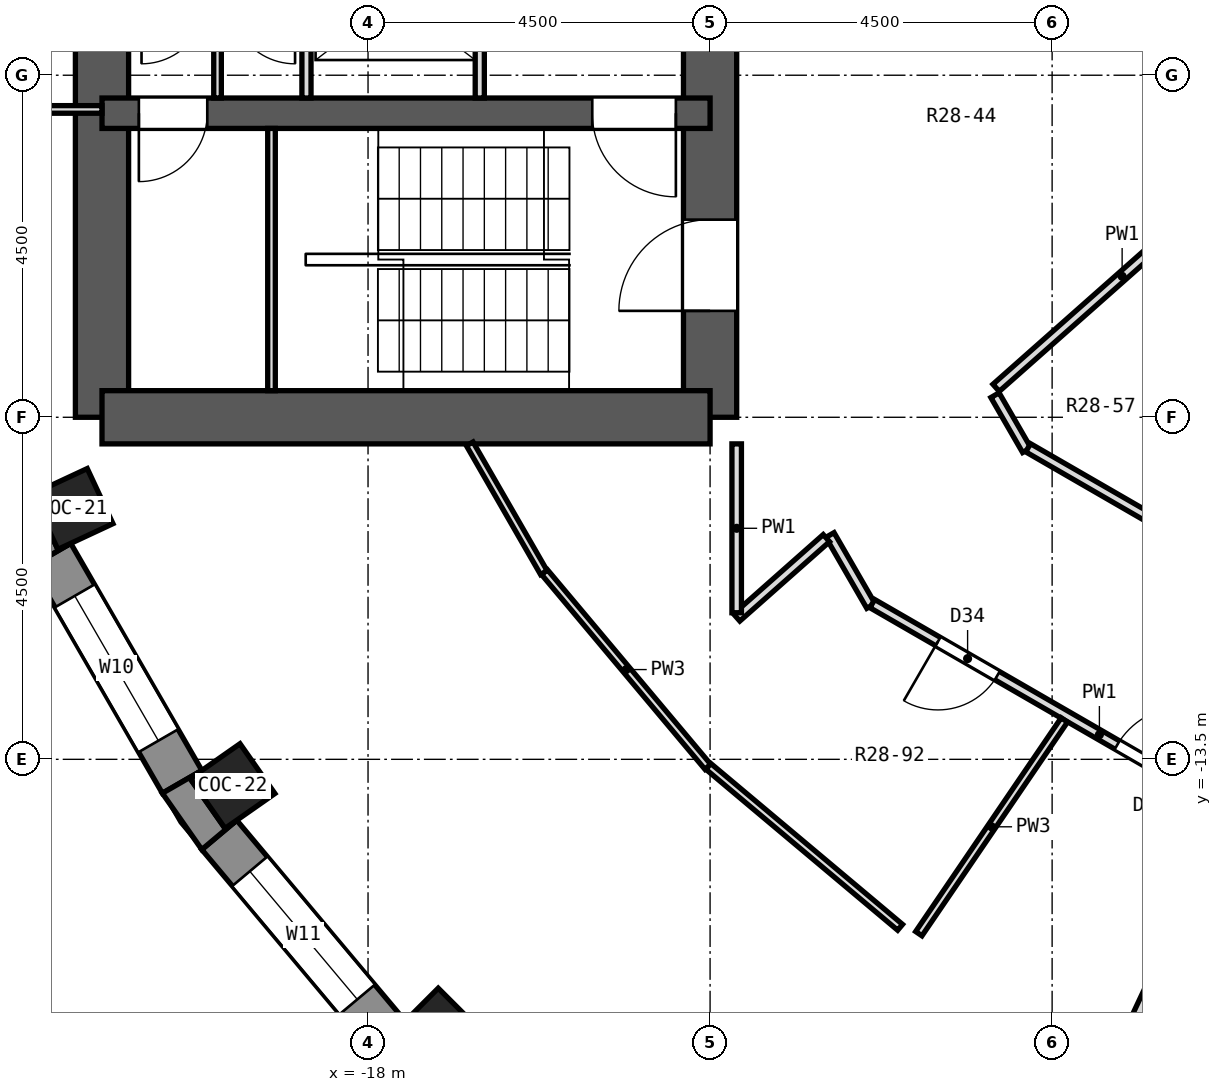
"""IFC4 building model, lengths in metres.
Left out: names, types, materials, properties, quantities, classifications, styles, units other than length and angle.
Written with IfcOpenShell. Run it as: python <this file> out.ifc"""

import sys

from ifc_helpers import new_model, si_unit, direction, frame, frame_2d, origin, origin_2d, place, context, subcontext, project, spatial, polyline, rectangle, outline, extrude, element, fill, save


model = new_model("IFC4")
c1 = context("Model", 3, precision=1e-05, world=origin(), true_north=direction((0.0, 1.0)))
c2 = subcontext(c1, "Body", "Model", "MODEL_VIEW")
j1 = project(units=[si_unit("LENGTHUNIT", "METRE"), si_unit("PLANEANGLEUNIT", "RADIAN")], contexts=[c1])
p1 = place(None, origin())
s1 = spatial("IfcSite", under=j1, at=p1, CompositionType="ELEMENT")
p2 = place(p1, origin())
s2 = spatial("IfcBuilding", under=s1, at=p2, CompositionType="ELEMENT")
p3 = place(p2, frame((0.0, 0.0, 190.5)))
s3 = spatial("IfcBuildingStorey", under=s2, at=p3, CompositionType="ELEMENT", Elevation=190.5)
for number, where, z_axis, x_axis in (
    (1, (-21.887, -10.206, 0.0), (0.0, 0.0, 1.0), (-0.906, -0.423, 0.0)),
    (2, (-19.782, -13.852, 0.0), (0.0, 0.0, 1.0), (-0.819, -0.574, 0.0)),
    (3, (-17.077, -17.077, 0.0), (0.0, 0.0, 1.0), (-0.707, -0.707, 0.0)),
):
    element("IfcColumn", number, at=place(p3, frame(where, z_axis=z_axis, x_axis=x_axis)), inside=s3, PredefinedType="COLUMN", context=c2, shape_type="SweptSolid", body=[
        extrude(rectangle(XDim=0.8, YDim=0.8, at=origin_2d()), origin(), (0.0, 0.0, 1.0), 3.3),
    ])
p4 = place(p3, frame((-13.5, -9.0, 0.0), z_axis=(0.0, 0.0, 1.0), x_axis=(0.0, 1.0, 0.0)))
e4 = element("IfcWall", 4, at=p4, inside=s3, PredefinedType="SHEAR", context=c2, shape_type="SweptSolid", body=[
    extrude(rectangle(XDim=18.0, YDim=0.7, at=frame_2d((9.0, 0.0))), origin(), (0.0, 0.0, 1.0), 3.3),
])
p5 = place(p4, frame((15.4, 0.0, 0.0)))
e5 = element("IfcOpeningElement", 5, at=p5, cuts=e4, PredefinedType="OPENING", context=c2, shape_type="SweptSolid", body=[
    extrude(rectangle(XDim=1.2, YDim=2.1, at=frame_2d((0.6, 1.05))), frame((0.0, 0.362, 0.0), z_axis=(0.0, -1.0, 0.0), x_axis=(1.0, 0.0, 0.0)), (0.0, 0.0, 1.0), 0.724),
])
p6 = place(p4, frame((1.4, 0.0, 0.0)))
e6 = element("IfcOpeningElement", 6, at=p6, cuts=e4, PredefinedType="OPENING", context=c2, shape_type="SweptSolid", body=[
    extrude(rectangle(XDim=1.2, YDim=2.1, at=frame_2d((0.6, 1.05))), frame((0.0, 0.362, 0.0), z_axis=(0.0, -1.0, 0.0), x_axis=(1.0, 0.0, 0.0)), (0.0, 0.0, 1.0), 0.724),
])
p7 = place(p4, frame((7.5, 0.0, 0.0)))
e7 = element("IfcOpeningElement", 7, at=p7, cuts=e4, PredefinedType="OPENING", context=c2, shape_type="SweptSolid", body=[
    extrude(rectangle(XDim=3.0, YDim=2.4, at=frame_2d((1.5, 1.2))), frame((0.0, 0.362, 0.0), z_axis=(0.0, -1.0, 0.0), x_axis=(1.0, 0.0, 0.0)), (0.0, 0.0, 1.0), 0.724),
])
p8 = place(p3, frame((-21.5, -9.0, 0.0), z_axis=(0.0, 0.0, 1.0), x_axis=(0.0, 1.0, 0.0)))
e8 = element("IfcWall", 8, at=p8, inside=s3, PredefinedType="SHEAR", context=c2, shape_type="SweptSolid", body=[
    extrude(rectangle(XDim=18.0, YDim=0.7, at=frame_2d((9.0, 0.0))), origin(), (0.0, 0.0, 1.0), 3.3),
])
p9 = place(p8, frame((9.45, 0.0, 0.0)))
e9 = element("IfcOpeningElement", 9, at=p9, cuts=e8, PredefinedType="OPENING", context=c2, shape_type="SweptSolid", body=[
    extrude(rectangle(XDim=0.9, YDim=2.1, at=frame_2d((0.45, 1.05))), frame((0.0, 0.362, 0.0), z_axis=(0.0, -1.0, 0.0), x_axis=(1.0, 0.0, 0.0)), (0.0, 0.0, 1.0), 0.724),
])
p10 = place(p8, frame((7.65, 0.0, 0.0)))
e10 = element("IfcOpeningElement", 10, at=p10, cuts=e8, PredefinedType="OPENING", context=c2, shape_type="SweptSolid", body=[
    extrude(rectangle(XDim=0.9, YDim=2.1, at=frame_2d((0.45, 1.05))), frame((0.0, 0.362, 0.0), z_axis=(0.0, -1.0, 0.0), x_axis=(1.0, 0.0, 0.0)), (0.0, 0.0, 1.0), 0.724),
])
p11 = place(p3, frame((-13.5, -9.0, 0.0), z_axis=(0.0, 0.0, 1.0), x_axis=(-1.0, 0.0, 0.0)))
e11 = element("IfcWall", 11, at=p11, inside=s3, PredefinedType="SHEAR", context=c2, shape_type="SweptSolid", body=[
    extrude(rectangle(XDim=8.0, YDim=0.7, at=frame_2d((4.0, 0.0))), origin(), (0.0, 0.0, 1.0), 3.3),
])
p12 = place(p3, frame((-13.5, -5.0, 0.0), z_axis=(0.0, 0.0, 1.0), x_axis=(-1.0, 0.0, 0.0)))
e12 = element("IfcWall", 12, at=p12, inside=s3, PredefinedType="SHEAR", context=c2, shape_type="SweptSolid", body=[
    extrude(rectangle(XDim=8.0, YDim=0.4, at=frame_2d((4.0, 0.0))), origin(), (0.0, 0.0, 1.0), 3.3),
])
p13 = place(p12, frame((6.615, 0.0, 0.0)))
e13 = element("IfcOpeningElement", 13, at=p13, cuts=e12, PredefinedType="OPENING", context=c2, shape_type="SweptSolid", body=[
    extrude(rectangle(XDim=0.9, YDim=2.1, at=frame_2d((0.45, 1.05))), frame((0.0, 0.212, 0.0), z_axis=(0.0, -1.0, 0.0), x_axis=(1.0, 0.0, 0.0)), (0.0, 0.0, 1.0), 0.424),
])
p14 = place(p12, frame((0.45, 0.0, 0.0)))
e14 = element("IfcOpeningElement", 14, at=p14, cuts=e12, PredefinedType="OPENING", context=c2, shape_type="SweptSolid", body=[
    extrude(rectangle(XDim=1.1, YDim=2.1, at=frame_2d((0.55, 1.05))), frame((0.0, 0.212, 0.0), z_axis=(0.0, -1.0, 0.0), x_axis=(1.0, 0.0, 0.0)), (0.0, 0.0, 1.0), 0.424),
])
p15 = place(p3, frame((-22.171, -10.809, 0.0), z_axis=(0.0, 0.0, 1.0), x_axis=(0.499998129301, -0.86602648383, 0.0)))
e15 = element("IfcWall", 15, at=p15, inside=s3, PredefinedType="SOLIDWALL", context=c2, shape_type="SweptSolid", body=[
    extrude(rectangle(XDim=3.45, YDim=0.6, at=frame_2d((1.725, 0.0))), origin(), (0.0, 0.0, 1.0), 2.85),
])
p16 = place(p15, frame((0.625, 0.0, 0.9)))
e16 = element("IfcOpeningElement", 16, at=p16, cuts=e15, PredefinedType="OPENING", context=c2, shape_type="SweptSolid", body=[
    extrude(rectangle(XDim=2.2, YDim=1.8, at=frame_2d((1.1, 0.9))), frame((0.0, 0.312, 0.0), z_axis=(0.0, -1.0, 0.0), x_axis=(1.0, 0.0, 0.0)), (0.0, 0.0, 1.0), 0.624),
])
p17 = place(p3, frame((-19.957, -14.494, 0.0), z_axis=(0.0, 0.0, 1.0), x_axis=(0.642770398358, -0.766058884809, 0.0)))
e17 = element("IfcWall", 17, at=p17, inside=s3, PredefinedType="SOLIDWALL", context=c2, shape_type="SweptSolid", body=[
    extrude(rectangle(XDim=3.449, YDim=0.6, at=frame_2d((1.725, 0.0))), origin(), (0.0, 0.0, 1.0), 2.85),
])
p18 = place(p17, frame((0.625, 0.0, 0.9)))
e18 = element("IfcOpeningElement", 18, at=p18, cuts=e17, PredefinedType="OPENING", context=c2, shape_type="SweptSolid", body=[
    extrude(rectangle(XDim=2.2, YDim=1.8, at=frame_2d((1.1, 0.9))), frame((0.0, 0.312, 0.0), z_axis=(0.0, -1.0, 0.0), x_axis=(1.0, 0.0, 0.0)), (0.0, 0.0, 1.0), 0.624),
])
p19 = place(p3, origin())
e19 = element("IfcWall", 19, at=p19, inside=s3, PredefinedType="SOLIDWALL", context=c2, shape_type="SweptSolid", body=[
    extrude(outline(polyline([(-22.431, -10.959), (-21.911, -10.659), (-22.081, -10.738), (-22.419, -10.013), (-22.249, -9.934), (-22.813, -10.139), (-22.431, -10.959)])), origin(), (0.0, 0.0, 1.0), 2.85),
])
p20 = place(p3, origin())
e20 = element("IfcWall", 20, at=p20, inside=s3, PredefinedType="SOLIDWALL", context=c2, shape_type="SweptSolid", body=[
    extrude(outline(polyline([(-20.706, -13.946), (-20.187, -14.687), (-19.727, -14.302), (-19.881, -14.409), (-20.34, -13.754), (-20.186, -13.646), (-20.706, -13.946)])), origin(), (0.0, 0.0, 1.0), 2.85),
])
p21 = place(p3, frame((-8.156, -2.474, 0.0), z_axis=(0.0, 0.0, 1.0), x_axis=(0.500033728941, -0.866005929495, 0.0)))
e21 = element("IfcWall", 21, at=p21, inside=s3, PredefinedType="SOLIDWALL", context=c2, shape_type="SweptSolid", body=[
    extrude(rectangle(XDim=3.87, YDim=0.6, at=frame_2d((1.935, 0.0))), origin(), (0.0, 0.0, 1.0), 2.85),
])
p22 = place(p21, frame((0.735, 0.0, 0.9)))
e22 = element("IfcOpeningElement", 22, at=p22, cuts=e21, PredefinedType="OPENING", context=c2, shape_type="SweptSolid", body=[
    extrude(rectangle(XDim=2.4, YDim=1.8, at=frame_2d((1.2, 0.9))), frame((0.0, 0.312, 0.0), z_axis=(0.0, -1.0, 0.0), x_axis=(1.0, 0.0, 0.0)), (0.0, 0.0, 1.0), 0.624),
])
p23 = place(p3, frame((-16.662, -9.35, 0.0), z_axis=(0.0, 0.0, 1.0), x_axis=(0.499012734814, -0.86659465178, 0.0)))
e23 = element("IfcWall", 23, at=p23, inside=s3, PredefinedType="PARTITIONING", context=c2, shape_type="SweptSolid", body=[
    extrude(rectangle(XDim=1.956, YDim=0.1, at=frame_2d((0.978, 0.0))), origin(), (0.0, 0.0, 1.0), 2.85),
])
p24 = place(p3, frame((-11.923, -10.549, 0.0), z_axis=(0.0, 0.0, 1.0), x_axis=(0.500304011038, -0.865849811769, 0.0)))
e24 = element("IfcWall", 24, at=p24, inside=s3, PredefinedType="PARTITIONING", context=c2, shape_type="SweptSolid", body=[
    extrude(rectangle(XDim=1.078, YDim=0.125, at=frame_2d((0.539, 0.0))), origin(), (0.0, 0.0, 1.0), 2.85),
])
p25 = place(p3, frame((-9.752, -8.709, 0.0), z_axis=(0.0, 0.0, 1.0), x_axis=(0.500194796412, -0.865912908809, 0.0)))
e25 = element("IfcWall", 25, at=p25, inside=s3, PredefinedType="PARTITIONING", context=c2, shape_type="SweptSolid", body=[
    extrude(rectangle(XDim=0.835, YDim=0.125, at=frame_2d((0.417, 0.0))), origin(), (0.0, 0.0, 1.0), 2.85),
])
p26 = place(p3, frame((-15.678, -11.038, 0.0), z_axis=(0.0, 0.0, 1.0), x_axis=(0.642837591944, -0.766002500247, 0.0)))
e26 = element("IfcWall", 26, at=p26, inside=s3, PredefinedType="PARTITIONING", context=c2, shape_type="SweptSolid", body=[
    extrude(rectangle(XDim=3.344, YDim=0.1, at=frame_2d((1.672, 0.0))), origin(), (0.0, 0.0, 1.0), 2.85),
])
p27 = place(p3, frame((-13.523, -13.593, 0.0), z_axis=(0.0, 0.0, 1.0), x_axis=(0.766059647018, -0.64276948995, 0.0)))
e27 = element("IfcWall", 27, at=p27, inside=s3, PredefinedType="PARTITIONING", context=c2, shape_type="SweptSolid", body=[
    extrude(rectangle(XDim=3.293, YDim=0.1, at=frame_2d((1.646, 0.0))), origin(), (0.0, 0.0, 1.0), 2.85),
])
p28 = place(p3, frame((-11.366, -11.451, 0.0), z_axis=(0.0, 0.0, 1.0), x_axis=(0.866032091518, -0.499988416326, 0.0)))
e28 = element("IfcWall", 28, at=p28, inside=s3, PredefinedType="PARTITIONING", context=c2, shape_type="SweptSolid", body=[
    extrude(rectangle(XDim=8.37, YDim=0.125, at=frame_2d((4.185, 0.0))), origin(), (0.0, 0.0, 1.0), 2.85),
])
p29 = place(p28, frame((0.998, 0.0, 0.0)))
e29 = element("IfcOpeningElement", 29, at=p29, cuts=e28, PredefinedType="OPENING", context=c2, shape_type="SweptSolid", body=[
    extrude(rectangle(XDim=0.9, YDim=2.1, at=frame_2d((0.45, 1.05))), frame((0.0, 0.074, 0.0), z_axis=(0.0, -1.0, 0.0), x_axis=(1.0, 0.0, 0.0)), (0.0, 0.0, 1.0), 0.149),
])
p30 = place(p28, frame((3.72, 0.0, 0.0)))
e30 = element("IfcOpeningElement", 30, at=p30, cuts=e28, PredefinedType="OPENING", context=c2, shape_type="SweptSolid", body=[
    extrude(rectangle(XDim=1.0, YDim=2.1, at=frame_2d((0.5, 1.05))), frame((0.0, 0.074, 0.0), z_axis=(0.0, -1.0, 0.0), x_axis=(1.0, 0.0, 0.0)), (0.0, 0.0, 1.0), 0.149),
])
p31 = place(p3, frame((-9.316, -9.401, 0.0), z_axis=(0.0, 0.0, 1.0), x_axis=(0.865996765544, -0.500049599607, 0.0)))
e31 = element("IfcWall", 31, at=p31, inside=s3, PredefinedType="PARTITIONING", context=c2, shape_type="SweptSolid", body=[
    extrude(rectangle(XDim=6.869, YDim=0.125, at=frame_2d((3.435, 0.0))), origin(), (0.0, 0.0, 1.0), 2.85),
])
p32 = place(p31, frame((2.816, 0.0, 0.0)))
e32 = element("IfcOpeningElement", 32, at=p32, cuts=e31, PredefinedType="OPENING", context=c2, shape_type="SweptSolid", body=[
    extrude(rectangle(XDim=1.0, YDim=2.1, at=frame_2d((0.5, 1.05))), frame((0.0, 0.074, 0.0), z_axis=(0.0, -1.0, 0.0), x_axis=(1.0, 0.0, 0.0)), (0.0, 0.0, 1.0), 0.149),
])
p33 = place(p3, frame((-13.15, -11.634, 0.0), z_axis=(0.0, 0.0, 1.0), x_axis=(0.748946277056, 0.662630722261, 0.0)))
e33 = element("IfcWall", 33, at=p33, inside=s3, PredefinedType="PARTITIONING", context=c2, shape_type="SweptSolid", body=[
    extrude(rectangle(XDim=1.575, YDim=0.125, at=frame_2d((0.788, 0.0))), origin(), (0.0, 0.0, 1.0), 2.85),
])
p34 = place(p3, frame((-9.737, -8.613, 0.0), z_axis=(0.0, 0.0, 1.0), x_axis=(0.748961830347, 0.662613142552, 0.0)))
e34 = element("IfcWall", 34, at=p34, inside=s3, PredefinedType="PARTITIONING", context=c2, shape_type="SweptSolid", body=[
    extrude(rectangle(XDim=4.428, YDim=0.125, at=frame_2d((2.214, 0.0))), origin(), (0.0, 0.0, 1.0), 2.85),
])
p35 = place(p3, frame((-10.754, -15.794, 0.0), z_axis=(0.0, 0.0, 1.0), x_axis=(0.562822277652, 0.826577935695, 0.0)))
e35 = element("IfcWall", 35, at=p35, inside=s3, PredefinedType="PARTITIONING", context=c2, shape_type="SweptSolid", body=[
    extrude(rectangle(XDim=3.402, YDim=0.1, at=frame_2d((1.701, 0.0))), origin(), (0.0, 0.0, 1.0), 2.85),
])
p36 = place(p3, frame((-10.041, -21.512, 0.0), z_axis=(0.0, 0.0, 1.0), x_axis=(0.424428415396, 0.905461495705, 0.0)))
e36 = element("IfcWall", 36, at=p36, inside=s3, PredefinedType="PARTITIONING", context=c2, shape_type="SweptSolid", body=[
    extrude(rectangle(XDim=8.018, YDim=0.15, at=frame_2d((4.009, 0.0))), origin(), (0.0, 0.0, 1.0), 2.85),
])
p37 = place(p3, frame((-13.15, -11.572, 0.0), z_axis=(0.0, 0.0, 1.0), x_axis=(0.0, 1.0, 0.0)))
e37 = element("IfcWall", 37, at=p37, inside=s3, PredefinedType="PARTITIONING", context=c2, shape_type="SweptSolid", body=[
    extrude(rectangle(XDim=2.221, YDim=0.125, at=frame_2d((1.111, 0.0))), origin(), (0.0, 0.0, 1.0), 2.85),
])
p38 = place(p3, frame((-21.5, -4.95, 0.0), z_axis=(0.0, 0.0, 1.0), x_axis=(-1.0, 0.0, 0.0)))
e38 = element("IfcWall", 38, at=p38, inside=s3, PredefinedType="PARTITIONING", context=c2, shape_type="SweptSolid", body=[
    extrude(rectangle(XDim=2.307, YDim=0.1, at=frame_2d((1.153, 0.0))), origin(), (0.0, 0.0, 1.0), 2.85),
])
p39 = place(p3, frame((-16.53, -4.8, 0.0), z_axis=(0.0, 0.0, 1.0), x_axis=(0.0, 1.0, 0.0)))
e39 = element("IfcWall", 39, at=p39, inside=s3, PredefinedType="PARTITIONING", context=c2, shape_type="SweptSolid", body=[
    extrude(rectangle(XDim=2.6, YDim=0.12, at=frame_2d((1.3, 0.0))), origin(), (0.0, 0.0, 1.0), 2.85),
])
p40 = place(p39, frame((0.75, 0.0, 0.0)))
e40 = element("IfcOpeningElement", 40, at=p40, cuts=e39, PredefinedType="OPENING", context=c2, shape_type="SweptSolid", body=[
    extrude(rectangle(XDim=1.1, YDim=2.1, at=frame_2d((0.55, 1.05))), frame((0.0, 0.072, 0.0), z_axis=(0.0, -1.0, 0.0), x_axis=(1.0, 0.0, 0.0)), (0.0, 0.0, 1.0), 0.144),
])
p41 = place(p3, frame((-18.81, -4.8, 0.0), z_axis=(0.0, 0.0, 1.0), x_axis=(0.0, 1.0, 0.0)))
e41 = element("IfcWall", 41, at=p41, inside=s3, PredefinedType="PARTITIONING", context=c2, shape_type="SweptSolid", body=[
    extrude(rectangle(XDim=2.6, YDim=0.12, at=frame_2d((1.3, 0.0))), origin(), (0.0, 0.0, 1.0), 2.85),
])
p42 = place(p3, frame((-19.98, -4.8, 0.0), z_axis=(0.0, 0.0, 1.0), x_axis=(0.0, 1.0, 0.0)))
e42 = element("IfcWall", 42, at=p42, inside=s3, PredefinedType="PARTITIONING", context=c2, shape_type="SweptSolid", body=[
    extrude(rectangle(XDim=2.6, YDim=0.1, at=frame_2d((1.3, 0.0))), origin(), (0.0, 0.0, 1.0), 2.85),
])
p43 = place(p3, frame((-19.27, -8.65, 0.0), z_axis=(0.0, 0.0, 1.0), x_axis=(0.0, 1.0, 0.0)))
e43 = element("IfcWall", 43, at=p43, inside=s3, PredefinedType="PARTITIONING", context=c2, shape_type="SweptSolid", body=[
    extrude(rectangle(XDim=3.45, YDim=0.1, at=frame_2d((1.725, 0.0))), origin(), (0.0, 0.0, 1.0), 2.85),
])
p44 = place(p16, origin())
e44 = element("IfcWindow", 44, at=p44, inside=s3, PartitioningType="SINGLE_PANEL", PredefinedType="WINDOW", context=c2, shape_type="SweptSolid", body=[
    extrude(rectangle(XDim=2.2, YDim=1.8, at=frame_2d((1.1, 0.9))), frame((0.0, 0.18, 0.0), z_axis=(0.0, -1.0, 0.0), x_axis=(1.0, 0.0, 0.0)), (0.0, 0.0, 1.0), 0.06),
])
fill(e16, e44)
p45 = place(p18, origin())
e45 = element("IfcWindow", 45, at=p45, inside=s3, PartitioningType="SINGLE_PANEL", PredefinedType="WINDOW", context=c2, shape_type="SweptSolid", body=[
    extrude(rectangle(XDim=2.2, YDim=1.8, at=frame_2d((1.1, 0.9))), frame((0.0, 0.18, 0.0), z_axis=(0.0, -1.0, 0.0), x_axis=(1.0, 0.0, 0.0)), (0.0, 0.0, 1.0), 0.06),
])
fill(e18, e45)
p46 = place(p22, origin())
e46 = element("IfcWindow", 46, at=p46, inside=s3, PartitioningType="SINGLE_PANEL", PredefinedType="WINDOW", context=c2, shape_type="SweptSolid", body=[
    extrude(rectangle(XDim=2.4, YDim=1.8, at=frame_2d((1.2, 0.9))), frame((0.0, -0.12, 0.0), z_axis=(0.0, -1.0, 0.0), x_axis=(1.0, 0.0, 0.0)), (0.0, 0.0, 1.0), 0.06),
])
fill(e22, e46)
p47 = place(p29, frame((0.9, 0.0, 0.0), z_axis=(0.0, 0.0, 1.0), x_axis=(-1.0, 0.0, 0.0)))
e47 = element("IfcDoor", 47, at=p47, inside=s3, OperationType="SINGLE_SWING_RIGHT", PredefinedType="DOOR", context=c2, shape_type="SweptSolid", body=[
    extrude(rectangle(XDim=0.9, YDim=2.1, at=frame_2d((0.45, 1.05))), frame((0.0, 0.025, 0.0), z_axis=(0.0, -1.0, 0.0), x_axis=(1.0, 0.0, 0.0)), (0.0, 0.0, 1.0), 0.05),
])
fill(e29, e47)
p48 = place(p30, origin())
e48 = element("IfcDoor", 48, at=p48, inside=s3, OperationType="SINGLE_SWING_RIGHT", PredefinedType="DOOR", context=c2, shape_type="SweptSolid", body=[
    extrude(rectangle(XDim=1.0, YDim=2.1, at=frame_2d((0.5, 1.05))), frame((0.0, 0.025, 0.0), z_axis=(0.0, -1.0, 0.0), x_axis=(1.0, 0.0, 0.0)), (0.0, 0.0, 1.0), 0.05),
])
fill(e30, e48)
p49 = place(p13, origin())
e49 = element("IfcDoor", 49, at=p49, inside=s3, OperationType="SINGLE_SWING_RIGHT", PredefinedType="DOOR", context=c2, shape_type="SweptSolid", body=[
    extrude(rectangle(XDim=0.9, YDim=2.1, at=frame_2d((0.45, 1.05))), frame((0.0, 0.025, 0.0), z_axis=(0.0, -1.0, 0.0), x_axis=(1.0, 0.0, 0.0)), (0.0, 0.0, 1.0), 0.05),
])
fill(e13, e49)
p50 = place(p14, origin())
e50 = element("IfcDoor", 50, at=p50, inside=s3, OperationType="SINGLE_SWING_LEFT", PredefinedType="DOOR", context=c2, shape_type="SweptSolid", body=[
    extrude(rectangle(XDim=1.1, YDim=2.1, at=frame_2d((0.55, 1.05))), frame((0.0, 0.025, 0.0), z_axis=(0.0, -1.0, 0.0), x_axis=(1.0, 0.0, 0.0)), (0.0, 0.0, 1.0), 0.05),
])
fill(e14, e50)
p51 = place(p6, origin())
e51 = element("IfcDoor", 51, at=p51, inside=s3, OperationType="SINGLE_SWING_LEFT", PredefinedType="DOOR", context=c2, shape_type="SweptSolid", body=[
    extrude(rectangle(XDim=1.2, YDim=2.1, at=frame_2d((0.6, 1.05))), frame((0.0, 0.025, 0.0), z_axis=(0.0, -1.0, 0.0), x_axis=(1.0, 0.0, 0.0)), (0.0, 0.0, 1.0), 0.05),
])
fill(e6, e51)
save(model, sys.argv[1])
